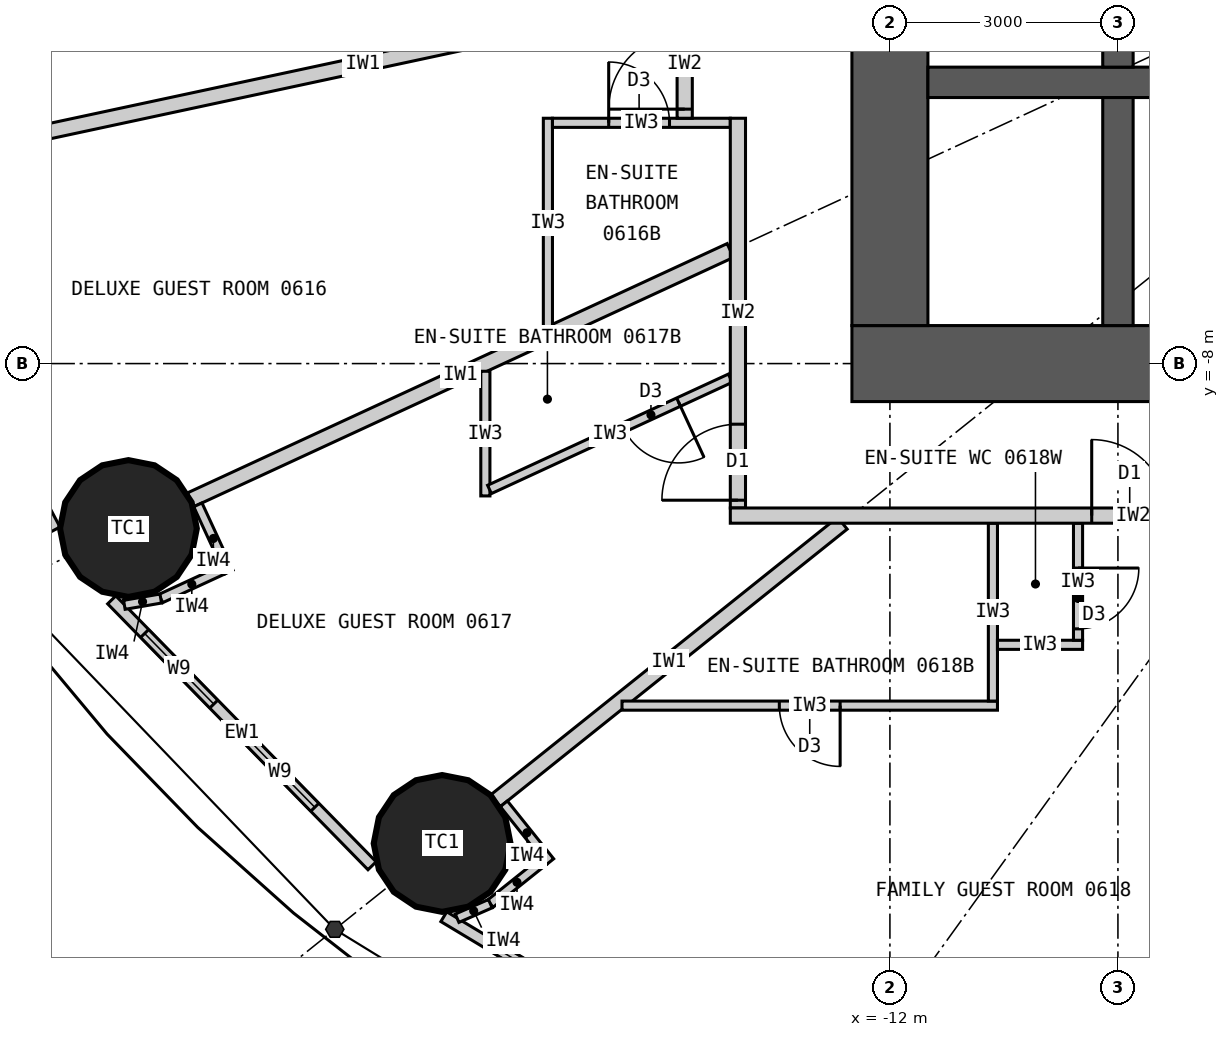
"""IFC4 building model, lengths in metres.
Left out: names, types, materials, properties, quantities, classifications, styles, units other than length and angle.
Written with IfcOpenShell. Run it as: python <this file> out.ifc"""

import sys

from ifc_helpers import new_model, si_unit, direction, frame, frame_2d, origin, origin_2d, place, context, subcontext, project, spatial, rectangle, circle, extrude, element, fill, save


model = new_model("IFC4")
c1 = context("Model", 3, precision=1e-05, world=origin(), true_north=direction((0.0, 1.0)))
c2 = subcontext(c1, "Body", "Model", "MODEL_VIEW")
j1 = project(units=[si_unit("LENGTHUNIT", "METRE"), si_unit("PLANEANGLEUNIT", "RADIAN")], contexts=[c1])
p1 = place(None, origin())
s1 = spatial("IfcSite", under=j1, at=p1, CompositionType="ELEMENT")
p2 = place(p1, origin())
s2 = spatial("IfcBuilding", under=s1, at=p2, CompositionType="ELEMENT")
p3 = place(p2, frame((0.0, 0.0, 32.7)))
s3 = spatial("IfcBuildingStorey", under=s2, at=p3, CompositionType="ELEMENT", Elevation=32.7)
for number, where, z_axis, x_axis in (
    (1, (-22.019, -10.17, 0.0), (0.0, 0.0, 1.0), (1.0, 0.0, 0.0)),
    (2, (-17.892, -14.313, 0.0), (0.0, 0.0, 1.0), (1.0, 0.0, 0.0)),
):
    element("IfcColumn", number, at=place(p3, frame(where, z_axis=z_axis, x_axis=x_axis)), inside=s3, PredefinedType="COLUMN", context=c2, shape_type="SweptSolid", body=[
        extrude(circle(Radius=0.9, at=origin_2d()), origin(), (0.0, 0.0, 1.0), 3.3),
    ])
p4 = place(p3, frame((12.5, -8.0, 0.0), z_axis=(0.0, 0.0, 1.0), x_axis=(-1.0, 0.0, 0.0)))
e3 = element("IfcWall", 3, at=p4, inside=s3, PredefinedType="SHEAR", context=c2, shape_type="SweptSolid", body=[
    extrude(rectangle(XDim=25.0, YDim=1.0, at=frame_2d((12.5, 0.0))), origin(), (0.0, 0.0, 1.0), 3.3),
])
p5 = place(p4, frame((11.2, 0.0, 0.0)))
e4 = element("IfcOpeningElement", 4, at=p5, cuts=e3, PredefinedType="OPENING", context=c2, shape_type="SweptSolid", body=[
    extrude(rectangle(XDim=1.2, YDim=2.2, at=frame_2d((0.6, 1.1))), frame((0.0, 0.51, 0.0), z_axis=(0.0, -1.0, 0.0), x_axis=(1.0, 0.0, 0.0)), (0.0, 0.0, 1.0), 1.02),
])
p6 = place(p4, frame((18.8, 0.0, 0.0)))
e5 = element("IfcOpeningElement", 5, at=p6, cuts=e3, PredefinedType="OPENING", context=c2, shape_type="SweptSolid", body=[
    extrude(rectangle(XDim=0.9, YDim=2.2, at=frame_2d((0.45, 1.1))), frame((0.0, 0.51, 0.0), z_axis=(0.0, -1.0, 0.0), x_axis=(1.0, 0.0, 0.0)), (0.0, 0.0, 1.0), 1.02),
])
p7 = place(p3, frame((-12.0, 7.5, 0.0), z_axis=(0.0, 0.0, 1.0), x_axis=(0.0, -1.0, 0.0)))
e6 = element("IfcWall", 6, at=p7, inside=s3, PredefinedType="SHEAR", context=c2, shape_type="SweptSolid", body=[
    extrude(rectangle(XDim=15.0, YDim=1.0, at=frame_2d((7.5, 0.0))), origin(), (0.0, 0.0, 1.0), 3.3),
])
p8 = place(p7, frame((6.6, 0.0, 0.0)))
e7 = element("IfcOpeningElement", 7, at=p8, cuts=e6, PredefinedType="OPENING", context=c2, shape_type="SweptSolid", body=[
    extrude(rectangle(XDim=1.8, YDim=2.2, at=frame_2d((0.9, 1.1))), frame((0.0, 0.51, 0.0), z_axis=(0.0, -1.0, 0.0), x_axis=(1.0, 0.0, 0.0)), (0.0, 0.0, 1.0), 1.02),
])
p9 = place(p3, frame((-11.5, -4.3, 0.0), z_axis=(0.0, 0.0, 1.0), x_axis=(1.0, 0.0, 0.0)))
e8 = element("IfcWall", 8, at=p9, inside=s3, PredefinedType="SHEAR", context=c2, shape_type="SweptSolid", body=[
    extrude(rectangle(XDim=23.0, YDim=0.4, at=frame_2d((11.5, 0.0))), origin(), (0.0, 0.0, 1.0), 3.3),
])
p10 = place(p3, frame((-9.0, -4.1, 0.0), z_axis=(0.0, 0.0, 1.0), x_axis=(0.0, 1.0, 0.0)))
e9 = element("IfcWall", 9, at=p10, inside=s3, PredefinedType="SHEAR", context=c2, shape_type="SweptSolid", body=[
    extrude(rectangle(XDim=2.35, YDim=0.4, at=frame_2d((1.175, 0.0))), origin(), (0.0, 0.0, 1.0), 3.3),
])
p11 = place(p3, frame((-9.0, -7.5, 0.0), z_axis=(0.0, 0.0, 1.0), x_axis=(0.0, 1.0, 0.0)))
e10 = element("IfcWall", 10, at=p11, inside=s3, PredefinedType="SHEAR", context=c2, shape_type="SweptSolid", body=[
    extrude(rectangle(XDim=3.0, YDim=0.4, at=frame_2d((1.5, 0.0))), origin(), (0.0, 0.0, 1.0), 3.3),
])
p12 = place(p3, frame((-25.139, -6.113, 0.0), z_axis=(0.0, 0.0, 1.0), x_axis=(0.467303182954, -0.884097129959, 0.0)))
e11 = element("IfcWall", 11, at=p12, inside=s3, PredefinedType="ELEMENTEDWALL", context=c2, shape_type="SweptSolid", body=[
    extrude(rectangle(XDim=4.606, YDim=0.15, at=frame_2d((2.303, 0.0))), origin(), (0.0, 0.0, 1.0), 3.12),
])
p13 = place(p12, frame((0.531, 0.0, 0.9)))
e12 = element("IfcOpeningElement", 12, at=p13, cuts=e11, PredefinedType="OPENING", context=c2, shape_type="SweptSolid", body=[
    extrude(rectangle(XDim=1.3, YDim=1.9, at=frame_2d((0.65, 0.95))), frame((0.0, 0.085, 0.0), z_axis=(0.0, -1.0, 0.0), x_axis=(1.0, 0.0, 0.0)), (0.0, 0.0, 1.0), 0.17),
])
p14 = place(p12, frame((2.432, 0.0, 0.9)))
e13 = element("IfcOpeningElement", 13, at=p14, cuts=e11, PredefinedType="OPENING", context=c2, shape_type="SweptSolid", body=[
    extrude(rectangle(XDim=1.3, YDim=1.9, at=frame_2d((0.65, 0.95))), frame((0.0, 0.085, 0.0), z_axis=(0.0, -1.0, 0.0), x_axis=(1.0, 0.0, 0.0)), (0.0, 0.0, 1.0), 0.17),
])
p15 = place(p3, frame((-22.239, -11.108, 0.0), z_axis=(0.0, 0.0, 1.0), x_axis=(0.699612594083, -0.714522370679, 0.0)))
e14 = element("IfcWall", 14, at=p15, inside=s3, PredefinedType="ELEMENTEDWALL", context=c2, shape_type="SweptSolid", body=[
    extrude(rectangle(XDim=4.896, YDim=0.15, at=frame_2d((2.448, 0.0))), origin(), (0.0, 0.0, 1.0), 3.12),
])
p16 = place(p15, frame((0.619, 0.0, 0.9)))
e15 = element("IfcOpeningElement", 15, at=p16, cuts=e14, PredefinedType="OPENING", context=c2, shape_type="SweptSolid", body=[
    extrude(rectangle(XDim=1.3, YDim=1.9, at=frame_2d((0.65, 0.95))), frame((0.0, 0.085, 0.0), z_axis=(0.0, -1.0, 0.0), x_axis=(1.0, 0.0, 0.0)), (0.0, 0.0, 1.0), 0.17),
])
p17 = place(p15, frame((2.519, 0.0, 0.9)))
e16 = element("IfcOpeningElement", 16, at=p17, cuts=e14, PredefinedType="OPENING", context=c2, shape_type="SweptSolid", body=[
    extrude(rectangle(XDim=1.3, YDim=1.9, at=frame_2d((0.65, 0.95))), frame((0.0, 0.085, 0.0), z_axis=(0.0, -1.0, 0.0), x_axis=(1.0, 0.0, 0.0)), (0.0, 0.0, 1.0), 0.17),
])
p18 = place(p3, frame((-17.869, -15.277, 0.0), z_axis=(0.0, 0.0, 1.0), x_axis=(0.856958191554, -0.515385931054, 0.0)))
e17 = element("IfcWall", 17, at=p18, inside=s3, PredefinedType="ELEMENTEDWALL", context=c2, shape_type="SweptSolid", body=[
    extrude(rectangle(XDim=5.201, YDim=0.15, at=frame_2d((2.601, 0.0))), origin(), (0.0, 0.0, 1.0), 3.12),
])
p19 = place(p18, frame((0.776, 0.0, 0.9)))
e18 = element("IfcOpeningElement", 18, at=p19, cuts=e17, PredefinedType="OPENING", context=c2, shape_type="SweptSolid", body=[
    extrude(rectangle(XDim=1.3, YDim=1.9, at=frame_2d((0.65, 0.95))), frame((0.0, 0.085, 0.0), z_axis=(0.0, -1.0, 0.0), x_axis=(1.0, 0.0, 0.0)), (0.0, 0.0, 1.0), 0.17),
])
p20 = place(p18, frame((2.676, 0.0, 0.9)))
e19 = element("IfcOpeningElement", 19, at=p20, cuts=e17, PredefinedType="OPENING", context=c2, shape_type="SweptSolid", body=[
    extrude(rectangle(XDim=1.3, YDim=1.9, at=frame_2d((0.65, 0.95))), frame((0.0, 0.085, 0.0), z_axis=(0.0, -1.0, 0.0), x_axis=(1.0, 0.0, 0.0)), (0.0, 0.0, 1.0), 0.17),
])
p21 = place(p3, frame((-14.1, -3.022, 0.0), z_axis=(0.0, 0.0, 1.0), x_axis=(-0.977786510688, -0.209603290805, 0.0)))
e20 = element("IfcWall", 20, at=p21, inside=s3, PredefinedType="PARTITIONING", context=c2, shape_type="SweptSolid", body=[
    extrude(rectangle(XDim=9.887, YDim=0.2, at=frame_2d((4.943, 0.0))), origin(), (0.0, 0.0, 1.0), 2.32),
])
p22 = place(p3, frame((-14.1, -6.512, 0.0), z_axis=(0.0, 0.0, 1.0), x_axis=(-0.907842433118, -0.41931147925, 0.0)))
e21 = element("IfcWall", 21, at=p22, inside=s3, PredefinedType="PARTITIONING", context=c2, shape_type="SweptSolid", body=[
    extrude(rectangle(XDim=7.823, YDim=0.2, at=frame_2d((3.912, 0.0))), origin(), (0.0, 0.0, 1.0), 2.32),
])
p23 = place(p3, frame((-12.625, -10.1, 0.0), z_axis=(0.0, 0.0, 1.0), x_axis=(-0.780872884676, -0.624689953479, 0.0)))
e22 = element("IfcWall", 22, at=p23, inside=s3, PredefinedType="PARTITIONING", context=c2, shape_type="SweptSolid", body=[
    extrude(rectangle(XDim=5.845, YDim=0.2, at=frame_2d((2.922, 0.0))), origin(), (0.0, 0.0, 1.0), 2.32),
])
p24 = place(p3, frame((-5.239, -10.1, 0.0), z_axis=(0.0, 0.0, 1.0), x_axis=(-0.460422783389, -0.887699758103, 0.0)))
e23 = element("IfcWall", 23, at=p24, inside=s3, PredefinedType="PARTITIONING", context=c2, shape_type="SweptSolid", body=[
    extrude(rectangle(XDim=10.12, YDim=0.2, at=frame_2d((5.06, 0.0))), origin(), (0.0, 0.0, 1.0), 3.12),
])
p25 = place(p3, frame((-16.5, -7.521, 0.0), z_axis=(0.0, 0.0, 1.0), x_axis=(0.0, 1.0, 0.0)))
e24 = element("IfcWall", 24, at=p25, inside=s3, PredefinedType="PARTITIONING", context=c2, shape_type="SweptSolid", body=[
    extrude(rectangle(XDim=2.749, YDim=0.12, at=frame_2d((1.374, 0.0))), origin(), (0.0, 0.0, 1.0), 3.12),
])
p26 = place(p3, frame((-14.1, -4.833, 0.0), z_axis=(0.0, 0.0, 1.0), x_axis=(-1.0, 0.0, 0.0)))
e25 = element("IfcWall", 25, at=p26, inside=s3, PredefinedType="PARTITIONING", context=c2, shape_type="SweptSolid", body=[
    extrude(rectangle(XDim=2.34, YDim=0.12, at=frame_2d((1.17, 0.0))), origin(), (0.0, 0.0, 1.0), 3.12),
])
p27 = place(p26, frame((0.8, 0.0, 0.0)))
e26 = element("IfcOpeningElement", 26, at=p27, cuts=e25, PredefinedType="OPENING", context=c2, shape_type="SweptSolid", body=[
    extrude(rectangle(XDim=0.8, YDim=2.1, at=frame_2d((0.4, 1.05))), frame((0.0, 0.07, 0.0), z_axis=(0.0, -1.0, 0.0), x_axis=(1.0, 0.0, 0.0)), (0.0, 0.0, 1.0), 0.14),
])
p28 = place(p3, frame((-17.323, -8.101, 0.0), z_axis=(0.0, 0.0, 1.0), x_axis=(0.0, -1.0, 0.0)))
e27 = element("IfcWall", 27, at=p28, inside=s3, PredefinedType="PARTITIONING", context=c2, shape_type="SweptSolid", body=[
    extrude(rectangle(XDim=1.64, YDim=0.12, at=frame_2d((0.82, 0.0))), origin(), (0.0, 0.0, 1.0), 3.12),
])
p29 = place(p3, frame((-14.1, -8.193, 0.0), z_axis=(0.0, 0.0, 1.0), x_axis=(-0.907836493557, -0.419324338628, 0.0)))
e28 = element("IfcWall", 28, at=p29, inside=s3, PredefinedType="PARTITIONING", context=c2, shape_type="SweptSolid", body=[
    extrude(rectangle(XDim=3.49, YDim=0.12, at=frame_2d((1.745, 0.0))), origin(), (0.0, 0.0, 1.0), 3.12),
])
p30 = place(p29, frame((0.75, 0.0, 0.0)))
e29 = element("IfcOpeningElement", 29, at=p30, cuts=e28, PredefinedType="OPENING", context=c2, shape_type="SweptSolid", body=[
    extrude(rectangle(XDim=0.8, YDim=2.1, at=frame_2d((0.4, 1.05))), frame((0.0, 0.07, 0.0), z_axis=(0.0, -1.0, 0.0), x_axis=(1.0, 0.0, 0.0)), (0.0, 0.0, 1.0), 0.14),
])
p31 = place(p3, frame((-15.525, -12.5, 0.0), z_axis=(0.0, 0.0, 1.0), x_axis=(1.0, 0.0, 0.0)))
e30 = element("IfcWall", 30, at=p31, inside=s3, PredefinedType="PARTITIONING", context=c2, shape_type="SweptSolid", body=[
    extrude(rectangle(XDim=4.94, YDim=0.12, at=frame_2d((2.47, 0.0))), origin(), (0.0, 0.0, 1.0), 3.12),
])
p32 = place(p31, frame((2.07, 0.0, 0.0)))
e31 = element("IfcOpeningElement", 31, at=p32, cuts=e30, PredefinedType="OPENING", context=c2, shape_type="SweptSolid", body=[
    extrude(rectangle(XDim=0.8, YDim=2.1, at=frame_2d((0.4, 1.05))), frame((0.0, 0.07, 0.0), z_axis=(0.0, -1.0, 0.0), x_axis=(1.0, 0.0, 0.0)), (0.0, 0.0, 1.0), 0.14),
])
p33 = place(p3, frame((-10.645, -10.1, 0.0), z_axis=(0.0, 0.0, 1.0), x_axis=(0.0, -1.0, 0.0)))
e32 = element("IfcWall", 32, at=p33, inside=s3, PredefinedType="PARTITIONING", context=c2, shape_type="SweptSolid", body=[
    extrude(rectangle(XDim=2.34, YDim=0.12, at=frame_2d((1.17, 0.0))), origin(), (0.0, 0.0, 1.0), 3.12),
])
p34 = place(p3, frame((-10.585, -11.7, 0.0), z_axis=(0.0, 0.0, 1.0), x_axis=(1.0, 0.0, 0.0)))
e33 = element("IfcWall", 33, at=p34, inside=s3, PredefinedType="PARTITIONING", context=c2, shape_type="SweptSolid", body=[
    extrude(rectangle(XDim=1.12, YDim=0.12, at=frame_2d((0.56, 0.0))), origin(), (0.0, 0.0, 1.0), 3.12),
])
p35 = place(p3, frame((-9.525, -10.1, 0.0), z_axis=(0.0, 0.0, 1.0), x_axis=(0.0, -1.0, 0.0)))
e34 = element("IfcWall", 34, at=p35, inside=s3, PredefinedType="PARTITIONING", context=c2, shape_type="SweptSolid", body=[
    extrude(rectangle(XDim=1.54, YDim=0.12, at=frame_2d((0.77, 0.0))), origin(), (0.0, 0.0, 1.0), 3.12),
])
p36 = place(p35, frame((0.59, 0.0, 0.0)))
e35 = element("IfcOpeningElement", 35, at=p36, cuts=e34, PredefinedType="OPENING", context=c2, shape_type="SweptSolid", body=[
    extrude(rectangle(XDim=0.8, YDim=2.1, at=frame_2d((0.4, 1.05))), frame((0.0, 0.07, 0.0), z_axis=(0.0, -1.0, 0.0), x_axis=(1.0, 0.0, 0.0)), (0.0, 0.0, 1.0), 0.14),
])
p37 = place(p3, frame((-14.7, -3.333, 0.0), z_axis=(0.0, 0.0, 1.0), x_axis=(0.0, -1.0, 0.0)))
e36 = element("IfcWall", 36, at=p37, inside=s3, PredefinedType="PARTITIONING", context=c2, shape_type="SweptSolid", body=[
    extrude(rectangle(XDim=1.44, YDim=0.2, at=frame_2d((0.72, 0.0))), origin(), (0.0, 0.0, 1.0), 3.12),
])
p38 = place(p37, frame((0.32, 0.0, 0.0)))
e37 = element("IfcOpeningElement", 37, at=p38, cuts=e36, PredefinedType="OPENING", context=c2, shape_type="SweptSolid", body=[
    extrude(rectangle(XDim=1.0, YDim=2.2, at=frame_2d((0.5, 1.1))), frame((0.0, 0.11, 0.0), z_axis=(0.0, -1.0, 0.0), x_axis=(1.0, 0.0, 0.0)), (0.0, 0.0, 1.0), 0.22),
])
p39 = place(p3, frame((-14.0, -4.772, 0.0), z_axis=(0.0, 0.0, 1.0), x_axis=(0.0, -1.0, 0.0)))
e38 = element("IfcWall", 38, at=p39, inside=s3, PredefinedType="PARTITIONING", context=c2, shape_type="SweptSolid", body=[
    extrude(rectangle(XDim=5.127, YDim=0.2, at=frame_2d((2.564, 0.0))), origin(), (0.0, 0.0, 1.0), 3.12),
])
p40 = place(p39, frame((4.025, 0.0, 0.0)))
e39 = element("IfcOpeningElement", 39, at=p40, cuts=e38, PredefinedType="OPENING", context=c2, shape_type="SweptSolid", body=[
    extrude(rectangle(XDim=1.0, YDim=2.2, at=frame_2d((0.5, 1.1))), frame((0.0, 0.11, 0.0), z_axis=(0.0, -1.0, 0.0), x_axis=(1.0, 0.0, 0.0)), (0.0, 0.0, 1.0), 0.22),
])
p41 = place(p3, frame((-3.499, -10.0, 0.0), z_axis=(0.0, 0.0, 1.0), x_axis=(-1.0, 0.0, 0.0)))
e40 = element("IfcWall", 40, at=p41, inside=s3, PredefinedType="PARTITIONING", context=c2, shape_type="SweptSolid", body=[
    extrude(rectangle(XDim=10.602, YDim=0.2, at=frame_2d((5.301, 0.0))), origin(), (0.0, 0.0, 1.0), 3.12),
])
p42 = place(p41, frame((4.846, 0.0, 0.0)))
e41 = element("IfcOpeningElement", 41, at=p42, cuts=e40, PredefinedType="OPENING", context=c2, shape_type="SweptSolid", body=[
    extrude(rectangle(XDim=1.0, YDim=2.2, at=frame_2d((0.5, 1.1))), frame((0.0, 0.11, 0.0), z_axis=(0.0, -1.0, 0.0), x_axis=(1.0, 0.0, 0.0)), (0.0, 0.0, 1.0), 0.22),
])
p43 = place(p3, frame((-21.106, -9.858, 0.0), z_axis=(0.0, 0.0, 1.0), x_axis=(0.419344098106, -0.907827366509, 0.0)))
e42 = element("IfcWall", 42, at=p43, inside=s3, PredefinedType="PARTITIONING", context=c2, shape_type="SweptSolid", body=[
    extrude(rectangle(XDim=0.975, YDim=0.12, at=frame_2d((0.487, 0.0))), origin(), (0.0, 0.0, 1.0), 3.12),
])
p44 = place(p3, frame((-20.777, -10.714, 0.0), z_axis=(0.0, 0.0, 1.0), x_axis=(-0.907832324198, -0.419333365166, 0.0)))
e43 = element("IfcWall", 43, at=p44, inside=s3, PredefinedType="PARTITIONING", context=c2, shape_type="SweptSolid", body=[
    extrude(rectangle(XDim=0.9, YDim=0.12, at=frame_2d((0.45, 0.0))), origin(), (0.0, 0.0, 1.0), 3.12),
])
p45 = place(p3, frame((-21.594, -11.091, 0.0), z_axis=(0.0, 0.0, 1.0), x_axis=(-0.985483306792, -0.169772353566, 0.0)))
e44 = element("IfcWall", 44, at=p45, inside=s3, PredefinedType="PARTITIONING", context=c2, shape_type="SweptSolid", body=[
    extrude(rectangle(XDim=0.486, YDim=0.12, at=frame_2d((0.243, 0.0))), origin(), (0.0, 0.0, 1.0), 3.12),
])
p46 = place(p3, frame((-17.08, -13.792, 0.0), z_axis=(0.0, 0.0, 1.0), x_axis=(0.624756144097, -0.780819928289, 0.0)))
e45 = element("IfcWall", 45, at=p46, inside=s3, PredefinedType="PARTITIONING", context=c2, shape_type="SweptSolid", body=[
    extrude(rectangle(XDim=0.975, YDim=0.12, at=frame_2d((0.487, 0.0))), origin(), (0.0, 0.0, 1.0), 3.12),
])
p47 = place(p3, frame((-16.555, -14.543, 0.0), z_axis=(0.0, 0.0, 1.0), x_axis=(-0.780789399477, -0.62479429708, 0.0)))
e46 = element("IfcWall", 46, at=p47, inside=s3, PredefinedType="PARTITIONING", context=c2, shape_type="SweptSolid", body=[
    extrude(rectangle(XDim=0.9, YDim=0.12, at=frame_2d((0.45, 0.0))), origin(), (0.0, 0.0, 1.0), 3.12),
])
p48 = place(p3, frame((-17.258, -15.106, 0.0), z_axis=(0.0, 0.0, 1.0), x_axis=(-0.916098562583, -0.400953143937, 0.0)))
e47 = element("IfcWall", 47, at=p48, inside=s3, PredefinedType="PARTITIONING", context=c2, shape_type="SweptSolid", body=[
    extrude(rectangle(XDim=0.477, YDim=0.12, at=frame_2d((0.238, 0.0))), origin(), (0.0, 0.0, 1.0), 3.12),
])
p49 = place(p16, origin())
e48 = element("IfcWindow", 48, at=p49, inside=s3, PartitioningType="SINGLE_PANEL", PredefinedType="WINDOW", context=c2, shape_type="SweptSolid", body=[
    extrude(rectangle(XDim=1.3, YDim=1.9, at=frame_2d((0.65, 0.95))), frame((0.0, 0.03, 0.0), z_axis=(0.0, -1.0, 0.0), x_axis=(1.0, 0.0, 0.0)), (0.0, 0.0, 1.0), 0.06),
])
fill(e15, e48)
p50 = place(p17, origin())
e49 = element("IfcWindow", 49, at=p50, inside=s3, PartitioningType="SINGLE_PANEL", PredefinedType="WINDOW", context=c2, shape_type="SweptSolid", body=[
    extrude(rectangle(XDim=1.3, YDim=1.9, at=frame_2d((0.65, 0.95))), frame((0.0, 0.03, 0.0), z_axis=(0.0, -1.0, 0.0), x_axis=(1.0, 0.0, 0.0)), (0.0, 0.0, 1.0), 0.06),
])
fill(e16, e49)
p51 = place(p19, origin())
e50 = element("IfcWindow", 50, at=p51, inside=s3, PartitioningType="SINGLE_PANEL", PredefinedType="WINDOW", context=c2, shape_type="SweptSolid", body=[
    extrude(rectangle(XDim=1.3, YDim=1.9, at=frame_2d((0.65, 0.95))), frame((0.0, 0.03, 0.0), z_axis=(0.0, -1.0, 0.0), x_axis=(1.0, 0.0, 0.0)), (0.0, 0.0, 1.0), 0.06),
])
fill(e18, e50)
p52 = place(p27, origin())
e51 = element("IfcDoor", 51, at=p52, inside=s3, OperationType="SINGLE_SWING_RIGHT", PredefinedType="DOOR", context=c2, shape_type="SweptSolid", body=[
    extrude(rectangle(XDim=0.8, YDim=2.1, at=frame_2d((0.4, 1.05))), frame((0.0, 0.025, 0.0), z_axis=(0.0, -1.0, 0.0), x_axis=(1.0, 0.0, 0.0)), (0.0, 0.0, 1.0), 0.05),
])
fill(e26, e51)
p53 = place(p38, origin())
e52 = element("IfcDoor", 52, at=p53, inside=s3, OperationType="SINGLE_SWING_RIGHT", PredefinedType="DOOR", context=c2, shape_type="SweptSolid", body=[
    extrude(rectangle(XDim=1.0, YDim=2.2, at=frame_2d((0.5, 1.1))), frame((0.0, 0.025, 0.0), z_axis=(0.0, -1.0, 0.0), x_axis=(1.0, 0.0, 0.0)), (0.0, 0.0, 1.0), 0.05),
])
fill(e37, e52)
p54 = place(p30, origin())
e53 = element("IfcDoor", 53, at=p54, inside=s3, OperationType="SINGLE_SWING_LEFT", PredefinedType="DOOR", context=c2, shape_type="SweptSolid", body=[
    extrude(rectangle(XDim=0.8, YDim=2.1, at=frame_2d((0.4, 1.05))), frame((0.0, 0.025, 0.0), z_axis=(0.0, -1.0, 0.0), x_axis=(1.0, 0.0, 0.0)), (0.0, 0.0, 1.0), 0.05),
])
fill(e29, e53)
p55 = place(p40, origin())
e54 = element("IfcDoor", 54, at=p55, inside=s3, OperationType="SINGLE_SWING_RIGHT", PredefinedType="DOOR", context=c2, shape_type="SweptSolid", body=[
    extrude(rectangle(XDim=1.0, YDim=2.2, at=frame_2d((0.5, 1.1))), frame((0.0, 0.025, 0.0), z_axis=(0.0, -1.0, 0.0), x_axis=(1.0, 0.0, 0.0)), (0.0, 0.0, 1.0), 0.05),
])
fill(e39, e54)
p56 = place(p32, origin())
e55 = element("IfcDoor", 55, at=p56, inside=s3, OperationType="SINGLE_SWING_RIGHT", PredefinedType="DOOR", context=c2, shape_type="SweptSolid", body=[
    extrude(rectangle(XDim=0.8, YDim=2.1, at=frame_2d((0.4, 1.05))), frame((0.0, 0.025, 0.0), z_axis=(0.0, -1.0, 0.0), x_axis=(1.0, 0.0, 0.0)), (0.0, 0.0, 1.0), 0.05),
])
fill(e31, e55)
p57 = place(p36, origin())
e56 = element("IfcDoor", 56, at=p57, inside=s3, OperationType="SINGLE_SWING_LEFT", PredefinedType="DOOR", context=c2, shape_type="SweptSolid", body=[
    extrude(rectangle(XDim=0.8, YDim=2.1, at=frame_2d((0.4, 1.05))), frame((0.0, 0.025, 0.0), z_axis=(0.0, -1.0, 0.0), x_axis=(1.0, 0.0, 0.0)), (0.0, 0.0, 1.0), 0.05),
])
fill(e35, e56)
p58 = place(p42, origin())
e57 = element("IfcDoor", 57, at=p58, inside=s3, OperationType="SINGLE_SWING_RIGHT", PredefinedType="DOOR", context=c2, shape_type="SweptSolid", body=[
    extrude(rectangle(XDim=1.0, YDim=2.2, at=frame_2d((0.5, 1.1))), frame((0.0, 0.025, 0.0), z_axis=(0.0, -1.0, 0.0), x_axis=(1.0, 0.0, 0.0)), (0.0, 0.0, 1.0), 0.05),
])
fill(e41, e57)
save(model, sys.argv[1])
